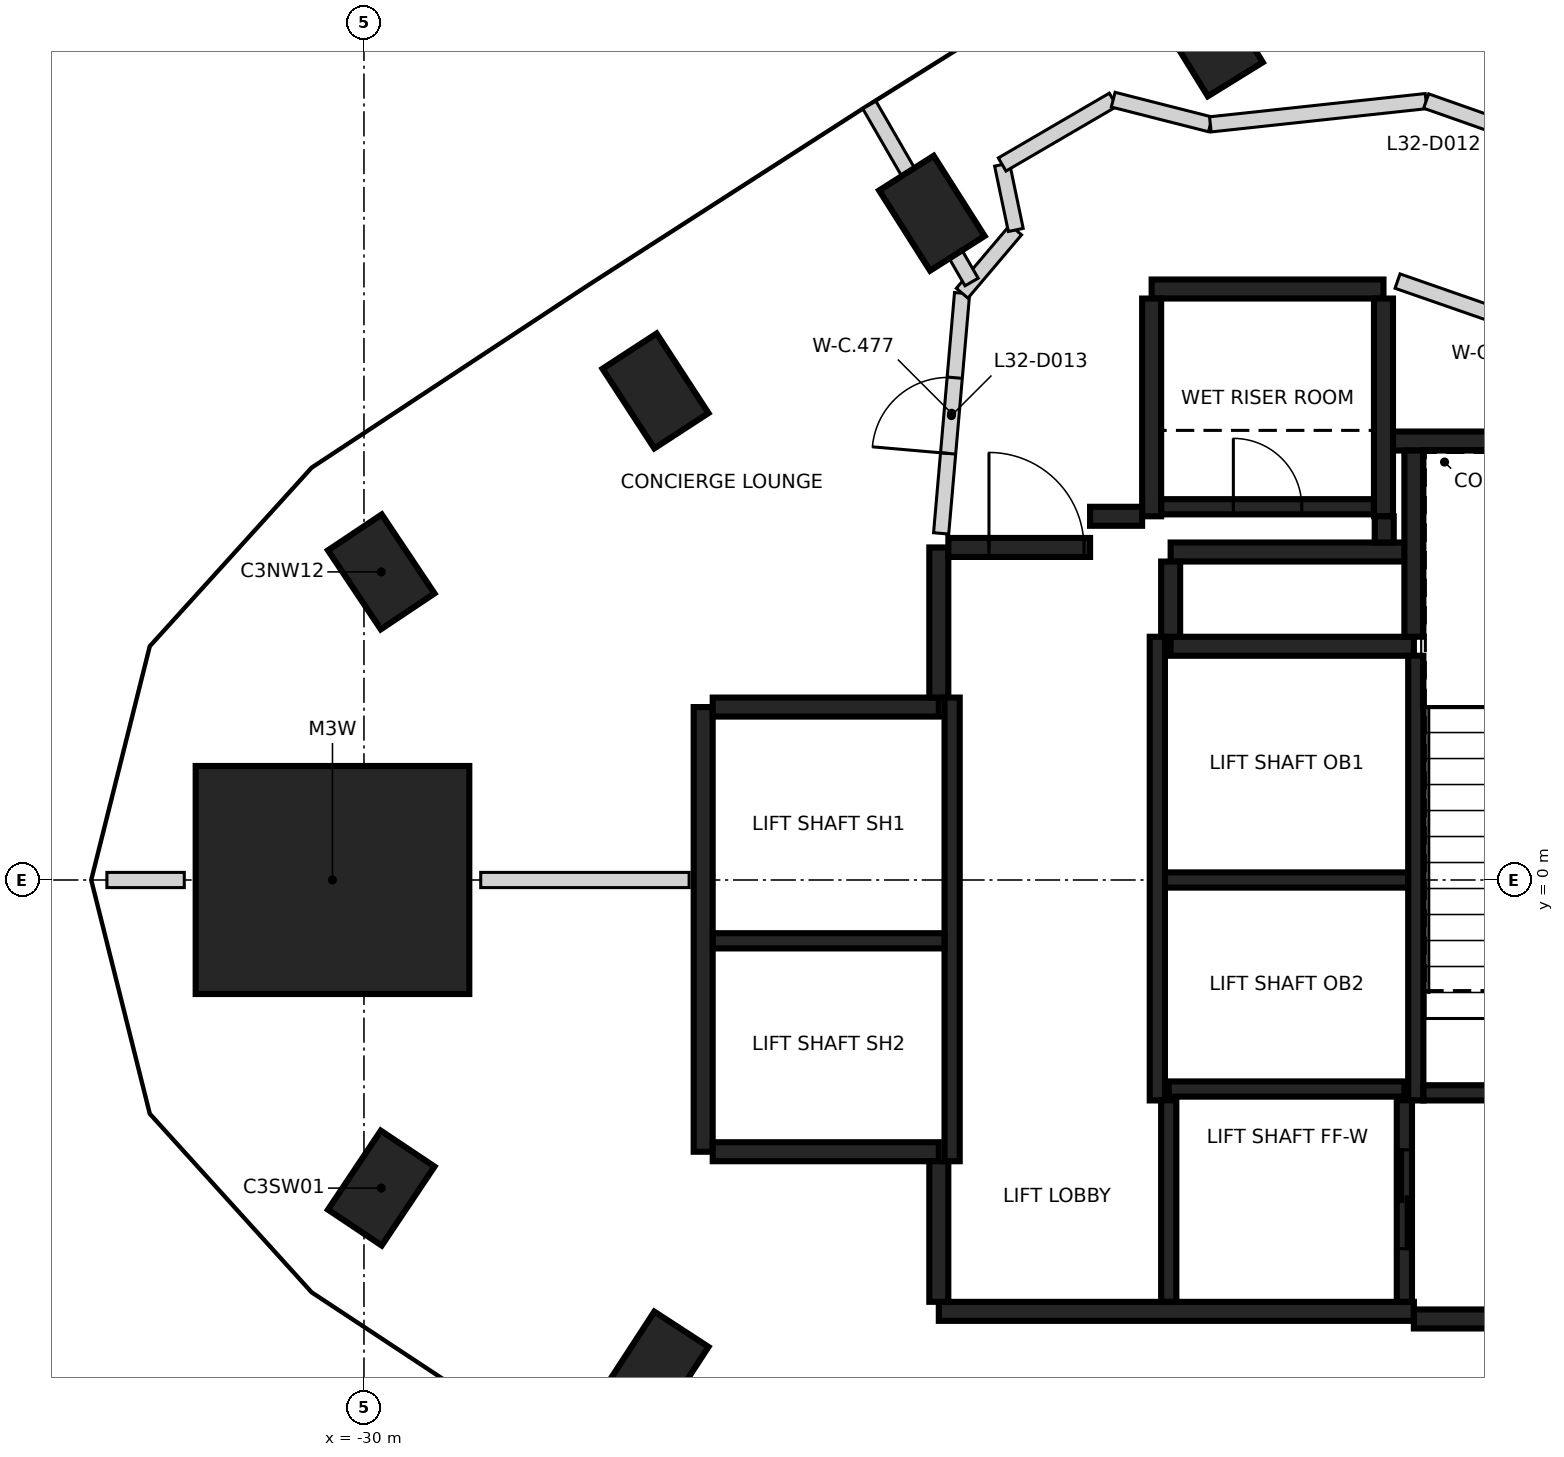
"""IFC4 building model, lengths in metres.
Left out: names, types, materials, properties, quantities, classifications, styles, units other than length and angle.
Written with IfcOpenShell. Run it as: python <this file> out.ifc"""

import sys

from ifc_helpers import new_model, si_unit, direction, frame, frame_2d, origin, origin_2d, place, context, subcontext, project, spatial, rectangle, extrude, element, fill, save


model = new_model("IFC4")
c1 = context("Model", 3, precision=1e-05, world=origin(), true_north=direction((0.0, 1.0)))
c2 = subcontext(c1, "Body", "Model", "MODEL_VIEW")
j1 = project(units=[si_unit("LENGTHUNIT", "METRE"), si_unit("PLANEANGLEUNIT", "RADIAN")], contexts=[c1])
p1 = place(None, origin())
s1 = spatial("IfcSite", under=j1, at=p1, CompositionType="ELEMENT")
p2 = place(p1, origin())
s2 = spatial("IfcBuilding", under=s1, at=p2, CompositionType="ELEMENT")
p3 = place(p2, frame((0.0, 0.0, 132.4)))
s3 = spatial("IfcBuildingStorey", under=s2, at=p3, CompositionType="ELEMENT", Elevation=132.4)
for number, where, z_axis, x_axis in (
    (1, (-18.865, 11.066, -0.4), (0.0, 0.0, 1.0), (-0.526, 0.851, 0.0)),
    (2, (-22.529, 8.772, -0.4), (0.0, 0.0, 1.0), (-0.536, 0.844, 0.0)),
    (3, (-26.165, 6.434, -0.4), (0.0, 0.0, 1.0), (-0.546, 0.838, 0.0)),
    (4, (-29.773, 4.053, -0.4), (0.0, 0.0, 1.0), (-0.556, 0.831, 0.0)),
    (5, (-29.773, -4.053, -0.4), (0.0, 0.0, 1.0), (0.556, 0.831, 0.0)),
    (6, (-26.165, -6.434, -0.4), (0.0, 0.0, 1.0), (0.546, 0.838, 0.0)),
):
    element("IfcColumn", number, at=place(p3, frame(where, z_axis=z_axis, x_axis=x_axis)), inside=s3, PredefinedType="COLUMN", context=c2, shape_type="SweptSolid", body=[
        extrude(rectangle(XDim=1.25, YDim=0.85, at=origin_2d()), origin(), (0.0, 0.0, 1.0), 3.6),
    ])
p4 = place(p3, frame((-30.414, 0.0, -0.4), z_axis=(0.0, 0.0, 1.0), x_axis=(1.0, 0.0, 0.0)))
e7 = element("IfcColumn", 7, at=p4, inside=s3, PredefinedType="COLUMN", context=c2, shape_type="SweptSolid", body=[
    extrude(rectangle(XDim=3.6, YDim=3.0, at=origin_2d()), origin(), (0.0, 0.0, 1.0), 3.6),
])
p5 = place(p3, frame((-16.187, -5.675, 0.0), z_axis=(0.0, 0.0, 1.0), x_axis=(-1.0, 0.0, 0.0)))
e8 = element("IfcWall", 8, at=p5, inside=s3, PredefinedType="SHEAR", context=c2, shape_type="SweptSolid", body=[
    extrude(rectangle(XDim=6.25, YDim=0.25, at=frame_2d((3.125, 0.0))), origin(), (0.0, 0.0, 1.0), 3.2),
])
p6 = place(p3, frame((-25.537, -3.575, 0.0), z_axis=(0.0, 0.0, 1.0), x_axis=(0.0, 1.0, 0.0)))
e9 = element("IfcWall", 9, at=p6, inside=s3, PredefinedType="SHEAR", context=c2, shape_type="SweptSolid", body=[
    extrude(rectangle(XDim=5.85, YDim=0.25, at=frame_2d((2.925, 0.0))), origin(), (0.0, 0.0, 1.0), 3.2),
])
p7 = place(p3, frame((-10.963, -5.775, 0.0), z_axis=(0.0, 0.0, 1.0), x_axis=(-1.0, 0.0, 0.0)))
e10 = element("IfcWall", 10, at=p7, inside=s3, PredefinedType="SHEAR", context=c2, shape_type="SweptSolid", body=[
    extrude(rectangle(XDim=5.225, YDim=0.25, at=frame_2d((2.612, 0.0))), origin(), (0.0, 0.0, 1.0), 3.2),
])
p8 = place(p3, frame((-16.472, 5.775, 0.0), z_axis=(0.0, 0.0, 1.0), x_axis=(1.0, 0.0, 0.0)))
e11 = element("IfcWall", 11, at=p8, inside=s3, PredefinedType="SHEAR", context=c2, shape_type="SweptSolid", body=[
    extrude(rectangle(XDim=5.51, YDim=0.25, at=frame_2d((2.755, 0.0))), origin(), (0.0, 0.0, 1.0), 3.2),
])
p9 = place(p3, frame((-19.387, 3.075, 0.0), z_axis=(0.0, 0.0, 1.0), x_axis=(1.0, 0.0, 0.0)))
e12 = element("IfcWall", 12, at=p9, inside=s3, PredefinedType="SHEAR", context=c2, shape_type="SweptSolid", body=[
    extrude(rectangle(XDim=3.2, YDim=0.25, at=frame_2d((1.6, 0.0))), origin(), (0.0, 0.0, 1.0), 3.2),
])
for number, where, z_axis, x_axis in (
    (13, (-22.437, -3.575, 0.0), (0.0, 0.0, 1.0), (-1.0, 0.0, 0.0)),
    (14, (-25.412, 2.275, 0.0), (0.0, 0.0, 1.0), (1.0, 0.0, 0.0)),
):
    element("IfcWall", number, at=place(p3, frame(where, z_axis=z_axis, x_axis=x_axis)), inside=s3, PredefinedType="SHEAR", context=c2, shape_type="SweptSolid", body=[
        extrude(rectangle(XDim=2.975, YDim=0.25, at=frame_2d((1.487, 0.0))), origin(), (0.0, 0.0, 1.0), 3.2),
    ])
p10 = place(p3, frame((-19.637, 7.775, 0.0), z_axis=(0.0, 0.0, 1.0), x_axis=(1.0, 0.0, 0.0)))
e15 = element("IfcWall", 15, at=p10, inside=s3, PredefinedType="SHEAR", context=c2, shape_type="SweptSolid", body=[
    extrude(rectangle(XDim=3.05, YDim=0.25, at=frame_2d((1.525, 0.0))), origin(), (0.0, 0.0, 1.0), 3.2),
])
for number, where, z_axis, x_axis in (
    (16, (-16.587, 7.65, 0.0), (0.0, 0.0, 1.0), (0.0, -1.0, 0.0)),
    (17, (-19.637, 4.785, 0.0), (0.0, 0.0, 1.0), (0.0, 1.0, 0.0)),
):
    element("IfcWall", number, at=place(p3, frame(where, z_axis=z_axis, x_axis=x_axis)), inside=s3, PredefinedType="SHEAR", context=c2, shape_type="SweptSolid", body=[
        extrude(rectangle(XDim=2.865, YDim=0.25, at=frame_2d((1.432, 0.0))), origin(), (0.0, 0.0, 1.0), 3.2),
    ])
p11 = place(p3, frame((-16.302, 4.315, 0.0), z_axis=(0.0, 0.0, 1.0), x_axis=(-1.0, 0.0, 0.0)))
e18 = element("IfcWall", 18, at=p11, inside=s3, PredefinedType="SHEAR", context=c2, shape_type="SweptSolid", body=[
    extrude(rectangle(XDim=3.085, YDim=0.25, at=frame_2d((1.542, 0.0))), origin(), (0.0, 0.0, 1.0), 3.2),
])
p12 = place(p3, frame((-16.187, 3.2, 0.0), z_axis=(0.0, 0.0, 1.0), x_axis=(0.0, 1.0, 0.0)))
e19 = element("IfcWall", 19, at=p12, inside=s3, PredefinedType="SHEAR", context=c2, shape_type="SweptSolid", body=[
    extrude(rectangle(XDim=2.449, YDim=0.25, at=frame_2d((1.225, 0.0))), origin(), (0.0, 0.0, 1.0), 3.2),
])
p13 = place(p3, frame((-22.437, 2.4, 0.0), z_axis=(0.0, 0.0, 1.0), x_axis=(0.0, 1.0, 0.0)))
e20 = element("IfcWall", 20, at=p13, inside=s3, PredefinedType="SHEAR", context=c2, shape_type="SweptSolid", body=[
    extrude(rectangle(XDim=1.975, YDim=0.25, at=frame_2d((0.987, 0.0))), origin(), (0.0, 0.0, 1.0), 3.2),
])
p14 = place(p3, frame((-22.437, -5.55, 0.0), z_axis=(0.0, 0.0, 1.0), x_axis=(0.0, 1.0, 0.0)))
e21 = element("IfcWall", 21, at=p14, inside=s3, PredefinedType="SHEAR", context=c2, shape_type="SweptSolid", body=[
    extrude(rectangle(XDim=1.849, YDim=0.25, at=frame_2d((0.925, 0.0))), origin(), (0.0, 0.0, 1.0), 3.2),
])
p15 = place(p3, frame((-22.312, 4.375, 0.0), z_axis=(0.0, 0.0, 1.0), x_axis=(1.0, 0.0, 0.0)))
e22 = element("IfcWall", 22, at=p15, inside=s3, PredefinedType="SHEAR", context=c2, shape_type="SweptSolid", body=[
    extrude(rectangle(XDim=1.865, YDim=0.25, at=frame_2d((0.932, 0.0))), origin(), (0.0, 0.0, 1.0), 3.2),
])
p16 = place(p15, frame((0.535, 0.0, 0.0)))
e23 = element("IfcOpeningElement", 23, at=p16, cuts=e22, PredefinedType="OPENING", context=c2, shape_type="SweptSolid", body=[
    extrude(rectangle(XDim=1.25, YDim=2.1, at=frame_2d((0.625, 1.05))), frame((0.0, 0.135, 0.0), z_axis=(0.0, -1.0, 0.0), x_axis=(1.0, 0.0, 0.0)), (0.0, 0.0, 1.0), 0.27),
])
p17 = place(p3, frame((-19.387, 4.19, 0.0), z_axis=(0.0, 0.0, 1.0), x_axis=(0.0, -1.0, 0.0)))
e24 = element("IfcWall", 24, at=p17, inside=s3, PredefinedType="SHEAR", context=c2, shape_type="SweptSolid", body=[
    extrude(rectangle(XDim=0.989, YDim=0.25, at=frame_2d((0.495, 0.0))), origin(), (0.0, 0.0, 1.0), 3.2),
])
p18 = place(p3, frame((-20.447, 4.785, 0.0), z_axis=(0.0, 0.0, 1.0), x_axis=(1.0, 0.0, 0.0)))
e25 = element("IfcWall", 25, at=p18, inside=s3, PredefinedType="SHEAR", context=c2, shape_type="SweptSolid", body=[
    extrude(rectangle(XDim=0.685, YDim=0.25, at=frame_2d((0.342, 0.0))), origin(), (0.0, 0.0, 1.0), 3.2),
])
p19 = place(p3, frame((-16.577, 4.785, 0.0), z_axis=(0.0, 0.0, 1.0), x_axis=(0.0, -1.0, 0.0)))
e26 = element("IfcWall", 26, at=p19, inside=s3, PredefinedType="SHEAR", context=c2, shape_type="SweptSolid", body=[
    extrude(rectangle(XDim=0.344, YDim=0.25, at=frame_2d((0.172, 0.0))), origin(), (0.0, 0.0, 1.0), 3.2),
])
p20 = place(p3, frame((-16.162, 2.951, 0.0), z_axis=(0.0, 0.0, 1.0), x_axis=(0.0, -1.0, 0.0)))
e27 = element("IfcWall", 27, at=p20, inside=s3, PredefinedType="SHEAR", context=c2, shape_type="SweptSolid", body=[
    extrude(rectangle(XDim=5.851, YDim=0.2, at=frame_2d((2.925, 0.0))), origin(), (0.0, 0.0, 1.0), 3.2),
])
for number, where, z_axis, x_axis in (
    (28, (-19.562, -2.9, 0.0), (0.0, 0.0, 1.0), (0.0, 1.0, 0.0)),
    (29, (-22.262, 2.4, 0.0), (0.0, 0.0, 1.0), (0.0, -1.0, 0.0)),
):
    element("IfcWall", number, at=place(p3, frame(where, z_axis=z_axis, x_axis=x_axis)), inside=s3, PredefinedType="SHEAR", context=c2, shape_type="SweptSolid", body=[
        extrude(rectangle(XDim=6.1, YDim=0.2, at=frame_2d((3.05, 0.0))), origin(), (0.0, 0.0, 1.0), 3.2),
    ])
p21 = place(p3, frame((-10.963, -2.8, 0.0), z_axis=(0.0, 0.0, 1.0), x_axis=(-1.0, 0.0, 0.0)))
e30 = element("IfcWall", 30, at=p21, inside=s3, PredefinedType="SHEAR", context=c2, shape_type="SweptSolid", body=[
    extrude(rectangle(XDim=5.098, YDim=0.2, at=frame_2d((2.549, 0.0))), origin(), (0.0, 0.0, 1.0), 3.2),
])
p22 = place(p21, frame((1.774, 0.0, 0.0)))
e31 = element("IfcOpeningElement", 31, at=p22, cuts=e30, PredefinedType="OPENING", context=c2, shape_type="SweptSolid", body=[
    extrude(rectangle(XDim=1.4, YDim=2.1, at=frame_2d((0.7, 1.05))), frame((0.0, 0.11, 0.0), z_axis=(0.0, -1.0, 0.0), x_axis=(1.0, 0.0, 0.0)), (0.0, 0.0, 1.0), 0.22),
])
p23 = place(p3, frame((-16.263, 0.0, 0.0), z_axis=(0.0, 0.0, 1.0), x_axis=(-1.0, 0.0, 0.0)))
e32 = element("IfcWall", 32, at=p23, inside=s3, PredefinedType="SHEAR", context=c2, shape_type="SweptSolid", body=[
    extrude(rectangle(XDim=3.198, YDim=0.2, at=frame_2d((1.599, 0.0))), origin(), (0.0, 0.0, 1.0), 3.2),
])
p24 = place(p3, frame((-22.363, -0.8, 0.0), z_axis=(0.0, 0.0, 1.0), x_axis=(-1.0, 0.0, 0.0)))
e33 = element("IfcWall", 33, at=p24, inside=s3, PredefinedType="SHEAR", context=c2, shape_type="SweptSolid", body=[
    extrude(rectangle(XDim=3.048, YDim=0.2, at=frame_2d((1.524, 0.0))), origin(), (0.0, 0.0, 1.0), 3.2),
])
p25 = place(p3, frame((-19.511, 4.91, 0.0), z_axis=(0.0, 0.0, 1.0), x_axis=(1.0, 0.0, 0.0)))
e34 = element("IfcWall", 34, at=p25, inside=s3, PredefinedType="SHEAR", context=c2, shape_type="SweptSolid", body=[
    extrude(rectangle(XDim=2.798, YDim=0.2, at=frame_2d((1.399, 0.0))), origin(), (0.0, 0.0, 1.0), 3.2),
])
p26 = place(p25, frame((0.949, 0.0, 0.0)))
e35 = element("IfcOpeningElement", 35, at=p26, cuts=e34, PredefinedType="OPENING", context=c2, shape_type="SweptSolid", body=[
    extrude(rectangle(XDim=0.9, YDim=2.1, at=frame_2d((0.45, 1.05))), frame((0.0, 0.11, 0.0), z_axis=(0.0, -1.0, 0.0), x_axis=(1.0, 0.0, 0.0)), (0.0, 0.0, 1.0), 0.22),
])
p27 = place(p3, frame((-19.412, -2.75, 0.0), z_axis=(0.0, 0.0, 1.0), x_axis=(1.0, 0.0, 0.0)))
e36 = element("IfcWall", 36, at=p27, inside=s3, PredefinedType="SHEAR", context=c2, shape_type="SweptSolid", body=[
    extrude(rectangle(XDim=3.1, YDim=0.2, at=frame_2d((1.55, 0.0))), origin(), (0.0, 0.0, 1.0), 3.2),
])
p28 = place(p3, frame((-16.312, -2.898, 0.0), z_axis=(0.0, 0.0, 1.0), x_axis=(0.0, -1.0, 0.0)))
e37 = element("IfcWall", 37, at=p28, inside=s3, PredefinedType="SHEAR", context=c2, shape_type="SweptSolid", body=[
    extrude(rectangle(XDim=2.651, YDim=0.2, at=frame_2d((1.325, 0.0))), origin(), (0.0, 0.0, 1.0), 3.2),
])
p29 = place(p28, frame((0.652, 0.0, 0.0)))
e38 = element("IfcOpeningElement", 38, at=p29, cuts=e37, PredefinedType="OPENING", context=c2, shape_type="SweptSolid", body=[
    extrude(rectangle(XDim=1.3, YDim=2.1, at=frame_2d((0.65, 1.05))), frame((0.0, 0.11, 0.0), z_axis=(0.0, -1.0, 0.0), x_axis=(1.0, 0.0, 0.0)), (0.0, 0.0, 1.0), 0.22),
])
p30 = place(p3, frame((-19.412, -5.549, 0.0), z_axis=(0.0, 0.0, 1.0), x_axis=(0.0, 1.0, 0.0)))
e39 = element("IfcWall", 39, at=p30, inside=s3, PredefinedType="SHEAR", context=c2, shape_type="SweptSolid", body=[
    extrude(rectangle(XDim=2.651, YDim=0.2, at=frame_2d((1.325, 0.0))), origin(), (0.0, 0.0, 1.0), 3.2),
])
p31 = place(p3, frame((-22.407, 4.56, 0.0), z_axis=(0.0, 0.0, 1.0), x_axis=(0.086898645684, 0.996217157741, 0.0)))
e40 = element("IfcWall", 40, at=p31, inside=s3, PredefinedType="PARTITIONING", context=c2, shape_type="SweptSolid", body=[
    extrude(rectangle(XDim=3.172, YDim=0.2, at=frame_2d((1.586, 0.0))), origin(), (0.0, 0.0, 1.0), 3.2),
])
p32 = place(p31, frame((1.056, 0.0, 0.0)))
e41 = element("IfcOpeningElement", 41, at=p32, cuts=e40, PredefinedType="OPENING", context=c2, shape_type="SweptSolid", body=[
    extrude(rectangle(XDim=1.0, YDim=2.1, at=frame_2d((0.5, 1.05))), frame((0.0, 0.11, 0.0), z_axis=(0.0, -1.0, 0.0), x_axis=(1.0, 0.0, 0.0)), (0.0, 0.0, 1.0), 0.22),
])
p33 = place(p3, frame((-22.13, 7.719, 0.0), z_axis=(0.0, 0.0, 1.0), x_axis=(0.646413536249, 0.762987247701, 0.0)))
e42 = element("IfcWall", 42, at=p33, inside=s3, PredefinedType="PARTITIONING", context=c2, shape_type="SweptSolid", body=[
    extrude(rectangle(XDim=1.091, YDim=0.2, at=frame_2d((0.545, 0.0))), origin(), (0.0, 0.0, 1.0), 3.2),
])
p34 = place(p3, frame((-21.605, 9.412, 0.0), z_axis=(0.0, 0.0, 1.0), x_axis=(0.204764111512, -0.978811349871, 0.0)))
e43 = element("IfcWall", 43, at=p34, inside=s3, PredefinedType="PARTITIONING", context=c2, shape_type="SweptSolid", body=[
    extrude(rectangle(XDim=0.879, YDim=0.2, at=frame_2d((0.439, 0.0))), origin(), (0.0, 0.0, 1.0), 2.3),
])
p35 = place(p3, frame((-21.604, 9.413, 0.0), z_axis=(0.0, 0.0, 1.0), x_axis=(0.863736988548, 0.503942868402, 0.0)))
e44 = element("IfcWall", 44, at=p35, inside=s3, PredefinedType="PARTITIONING", context=c2, shape_type="SweptSolid", body=[
    extrude(rectangle(XDim=1.69, YDim=0.2, at=frame_2d((0.845, 0.0))), origin(), (0.0, 0.0, 1.0), 2.3),
])
p36 = place(p3, frame((-20.143, 10.266, 0.0), z_axis=(0.0, 0.0, 1.0), x_axis=(0.969121308325, -0.246584447505, 0.0)))
e45 = element("IfcWall", 45, at=p36, inside=s3, PredefinedType="PARTITIONING", context=c2, shape_type="SweptSolid", body=[
    extrude(rectangle(XDim=1.319, YDim=0.2, at=frame_2d((0.659, 0.0))), origin(), (0.0, 0.0, 1.0), 2.3),
])
p37 = place(p3, frame((-18.865, 9.941, 0.0), z_axis=(0.0, 0.0, 1.0), x_axis=(0.99423123086, 0.107257911519, 0.0)))
e46 = element("IfcWall", 46, at=p37, inside=s3, PredefinedType="PARTITIONING", context=c2, shape_type="SweptSolid", body=[
    extrude(rectangle(XDim=2.854, YDim=0.2, at=frame_2d((1.427, 0.0))), origin(), (0.0, 0.0, 1.0), 3.2),
])
p38 = place(p3, frame((-16.402, 7.879, 0.0), z_axis=(0.0, 0.0, 1.0), x_axis=(0.944492255471, -0.328533680702, 0.0)))
e47 = element("IfcWall", 47, at=p38, inside=s3, PredefinedType="PARTITIONING", context=c2, shape_type="SweptSolid", body=[
    extrude(rectangle(XDim=5.802, YDim=0.2, at=frame_2d((2.901, 0.0))), origin(), (0.0, 0.0, 1.0), 3.2),
])
p39 = place(p38, frame((2.37, 0.0, 0.0)))
e48 = element("IfcOpeningElement", 48, at=p39, cuts=e47, PredefinedType="OPENING", context=c2, shape_type="SweptSolid", body=[
    extrude(rectangle(XDim=1.0, YDim=2.1, at=frame_2d((0.5, 1.05))), frame((0.0, 0.11, 0.0), z_axis=(0.0, -1.0, 0.0), x_axis=(1.0, 0.0, 0.0)), (0.0, 0.0, 1.0), 0.22),
])
p40 = place(p3, frame((-16.026, 10.248, 0.0), z_axis=(0.0, 0.0, 1.0), x_axis=(0.943234993827, -0.332126100179, 0.0)))
e49 = element("IfcWall", 49, at=p40, inside=s3, PredefinedType="PARTITIONING", context=c2, shape_type="SweptSolid", body=[
    extrude(rectangle(XDim=6.239, YDim=0.2, at=frame_2d((3.119, 0.0))), origin(), (0.0, 0.0, 1.0), 3.2),
])
p41 = place(p40, frame((4.355, 0.0, 0.0)))
e50 = element("IfcOpeningElement", 50, at=p41, cuts=e49, PredefinedType="OPENING", context=c2, shape_type="SweptSolid", body=[
    extrude(rectangle(XDim=1.0, YDim=2.1, at=frame_2d((0.5, 1.05))), frame((0.0, 0.11, 0.0), z_axis=(0.0, -1.0, 0.0), x_axis=(1.0, 0.0, 0.0)), (0.0, 0.0, 1.0), 0.22),
])
p42 = place(p40, frame((1.251, 0.0, 0.0)))
e51 = element("IfcOpeningElement", 51, at=p42, cuts=e49, PredefinedType="OPENING", context=c2, shape_type="SweptSolid", body=[
    extrude(rectangle(XDim=1.0, YDim=2.1, at=frame_2d((0.5, 1.05))), frame((0.0, 0.11, 0.0), z_axis=(0.0, -1.0, 0.0), x_axis=(1.0, 0.0, 0.0)), (0.0, 0.0, 1.0), 0.22),
])
p43 = place(p3, frame((-33.382, 0.0, 0.0), z_axis=(0.0, 0.0, 1.0), x_axis=(1.0, 0.0, 0.0)))
e52 = element("IfcWall", 52, at=p43, inside=s3, PredefinedType="PARTITIONING", context=c2, shape_type="SweptSolid", body=[
    extrude(rectangle(XDim=1.018, YDim=0.2, at=frame_2d((0.509, 0.0))), origin(), (0.0, 0.0, 1.0), 3.2),
])
p44 = place(p3, frame((-28.464, 0.0, 0.0), z_axis=(0.0, 0.0, 1.0), x_axis=(1.0, 0.0, 0.0)))
e53 = element("IfcWall", 53, at=p44, inside=s3, PredefinedType="PARTITIONING", context=c2, shape_type="SweptSolid", body=[
    extrude(rectangle(XDim=2.742, YDim=0.2, at=frame_2d((1.371, 0.0))), origin(), (0.0, 0.0, 1.0), 3.2),
])
p45 = place(p3, frame((-23.351, 10.197, 0.0), z_axis=(0.0, 0.0, 1.0), x_axis=(0.49992673358, -0.86606770004, 0.0)))
e54 = element("IfcWall", 54, at=p45, inside=s3, PredefinedType="PARTITIONING", context=c2, shape_type="SweptSolid", body=[
    extrude(rectangle(XDim=2.69, YDim=0.2, at=frame_2d((1.345, 0.0))), origin(), (0.0, 0.0, 1.0), 3.2),
])
p46 = place(p3, frame((-15.996, 14.74, 0.0), z_axis=(0.0, 0.0, 1.0), x_axis=(0.499925398456, -0.866068470722, 0.0)))
e55 = element("IfcWall", 55, at=p46, inside=s3, PredefinedType="PARTITIONING", context=c2, shape_type="SweptSolid", body=[
    extrude(rectangle(XDim=6.526, YDim=0.2, at=frame_2d((3.263, 0.0))), origin(), (0.0, 0.0, 1.0), 3.2),
])
p47 = place(p29, origin())
e56 = element("IfcDoor", 56, at=p47, inside=s3, OperationType="SLIDING_TO_RIGHT", PredefinedType="DOOR", context=c2, shape_type="SweptSolid", body=[
    extrude(rectangle(XDim=1.3, YDim=2.1, at=frame_2d((0.65, 1.05))), frame((0.0, 0.025, 0.0), z_axis=(0.0, -1.0, 0.0), x_axis=(1.0, 0.0, 0.0)), (0.0, 0.0, 1.0), 0.05),
])
fill(e38, e56)
p48 = place(p16, origin())
e57 = element("IfcDoor", 57, at=p48, inside=s3, OperationType="SINGLE_SWING_LEFT", PredefinedType="DOOR", context=c2, shape_type="SweptSolid", body=[
    extrude(rectangle(XDim=1.25, YDim=2.1, at=frame_2d((0.625, 1.05))), frame((0.0, 0.025, 0.0), z_axis=(0.0, -1.0, 0.0), x_axis=(1.0, 0.0, 0.0)), (0.0, 0.0, 1.0), 0.05),
])
fill(e23, e57)
p49 = place(p26, origin())
e58 = element("IfcDoor", 58, at=p49, inside=s3, OperationType="SINGLE_SWING_LEFT", PredefinedType="DOOR", context=c2, shape_type="SweptSolid", body=[
    extrude(rectangle(XDim=0.9, YDim=2.1, at=frame_2d((0.45, 1.05))), frame((0.0, 0.025, 0.0), z_axis=(0.0, -1.0, 0.0), x_axis=(1.0, 0.0, 0.0)), (0.0, 0.0, 1.0), 0.05),
])
fill(e35, e58)
p50 = place(p32, origin())
e59 = element("IfcDoor", 59, at=p50, inside=s3, OperationType="SINGLE_SWING_LEFT", PredefinedType="DOOR", context=c2, shape_type="SweptSolid", body=[
    extrude(rectangle(XDim=1.0, YDim=2.1, at=frame_2d((0.5, 1.05))), frame((0.0, 0.025, 0.0), z_axis=(0.0, -1.0, 0.0), x_axis=(1.0, 0.0, 0.0)), (0.0, 0.0, 1.0), 0.05),
])
fill(e41, e59)
save(model, sys.argv[1])
